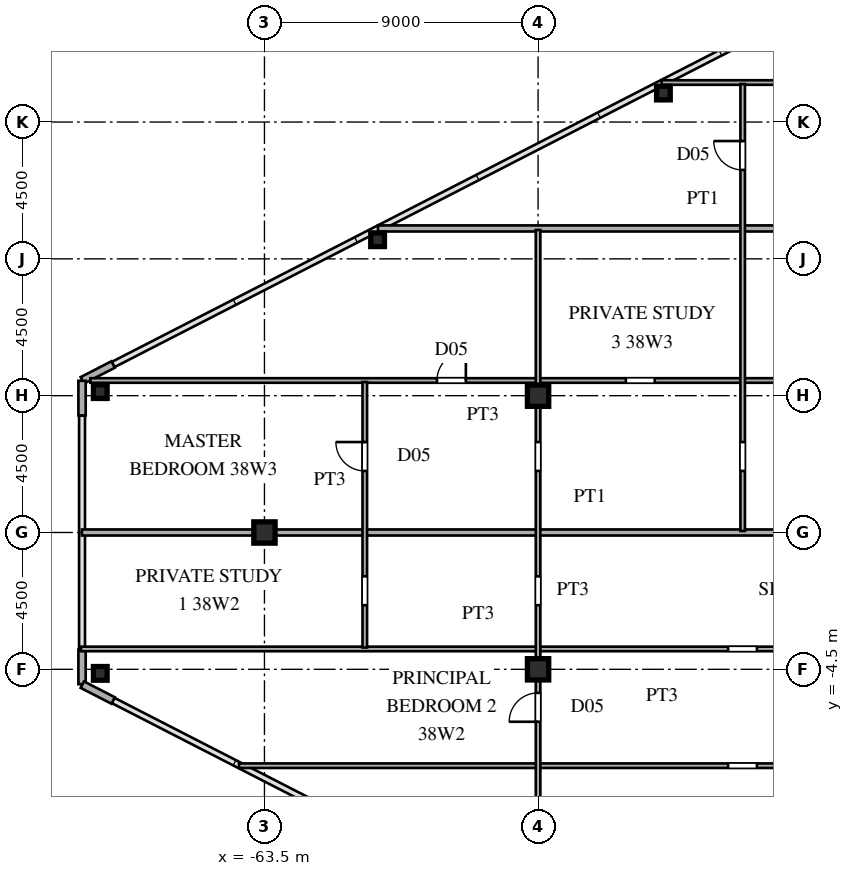
"""IFC4 building model, lengths in metres.
Left out: names, types, materials, properties, quantities, classifications, styles, units other than length and angle.
Written with IfcOpenShell. Run it as: python <this file> out.ifc"""

import sys

from ifc_helpers import new_model, si_unit, direction, frame, frame_2d, origin, origin_2d, place, context, subcontext, project, spatial, rectangle, hollow_rectangle, i_section, extrude, source, transform, mapped, element, fill, save


model = new_model("IFC4")
c1 = context("Model", 3, precision=1e-05, world=origin(), true_north=direction((0.0, 1.0)))
c2 = subcontext(c1, "Body", "Model", "MODEL_VIEW")
j1 = project(units=[si_unit("LENGTHUNIT", "METRE"), si_unit("PLANEANGLEUNIT", "RADIAN")], contexts=[c1])
p1 = place(None, origin())
s1 = spatial("IfcSite", under=j1, at=p1, CompositionType="ELEMENT")
p2 = place(p1, origin())
s2 = spatial("IfcBuilding", under=s1, at=p2, CompositionType="ELEMENT")
p3 = place(p2, frame((0.0, 0.0, 144.0)))
s3 = spatial("IfcBuildingStorey", under=s2, at=p3, CompositionType="ELEMENT", Elevation=144.0)
m1 = source(origin(), c2, "Body", "SweptSolid", [
    extrude(i_section(OverallWidth=0.7, OverallDepth=0.7, WebThickness=0.028, FlangeThickness=0.045, at=origin_2d()), origin(), (0.0, 0.0, 1.0), 3.6),
])
for number, where, z_axis, x_axis in (
    (1, (-54.5, -4.5, 0.0), (0.0, 0.0, 1.0), (1.0, 0.0, 0.0)),
    (2, (-54.5, 4.5, 0.0), (0.0, 0.0, 1.0), (1.0, 0.0, 0.0)),
    (3, (-63.5, 0.0, 0.0), (0.0, 0.0, 1.0), (1.0, 0.0, 0.0)),
):
    element("IfcColumn", number, at=place(p3, frame(where, z_axis=z_axis, x_axis=x_axis)), inside=s3, PredefinedType="COLUMN", context=c2, shape_type="MappedRepresentation", body=[
        mapped(m1, transform((0.0, 0.0, 0.0), scale=1.0)),
    ])
m2 = source(origin(), c2, "Body", "SweptSolid", [
    extrude(hollow_rectangle(XDim=0.45, YDim=0.45, WallThickness=0.018, at=origin_2d()), origin(), (0.0, 0.0, 1.0), 3.6),
])
for number, where, z_axis, x_axis in (
    (4, (-68.9, 4.634, 0.0), (0.0, 0.0, 1.0), (1.0, 0.0, 0.0)),
    (5, (-68.9, -4.634, 0.0), (0.0, 0.0, 1.0), (1.0, 0.0, 0.0)),
    (6, (-50.377, 14.453, 0.0), (0.0, 0.0, 1.0), (1.0, 0.0, 0.0)),
    (7, (-59.779, 9.629, 0.0), (0.0, 0.0, 1.0), (1.0, 0.0, 0.0)),
):
    element("IfcColumn", number, at=place(p3, frame(where, z_axis=z_axis, x_axis=x_axis)), inside=s3, PredefinedType="COLUMN", context=c2, shape_type="MappedRepresentation", body=[
        mapped(m2, transform((0.0, 0.0, 0.0), scale=1.0)),
    ])
p4 = place(p3, frame((-68.477, 5.525, 0.0), z_axis=(0.0, 0.0, 1.0), x_axis=(-0.889797395748, -0.456355776255, 0.0)))
e8 = element("IfcWall", 8, at=p4, inside=s3, PredefinedType="SOLIDWALL", context=c2, shape_type="SweptSolid", body=[
    extrude(rectangle(XDim=1.14, YDim=0.24, at=frame_2d((0.57, 0.0))), origin(), (0.0, 0.0, 1.0), 3.38),
])
for number, where, z_axis, x_axis in (
    (9, (-69.5, 4.99, 0.0), (0.0, 0.0, 1.0), (0.0, -1.0, 0.0)),
    (10, (-69.5, -3.85, 0.0), (0.0, 0.0, 1.0), (0.0, -1.0, 0.0)),
):
    element("IfcWall", number, at=place(p3, frame(where, z_axis=z_axis, x_axis=x_axis)), inside=s3, PredefinedType="SOLIDWALL", context=c2, shape_type="SweptSolid", body=[
        extrude(rectangle(XDim=1.14, YDim=0.24, at=frame_2d((0.57, 0.0))), origin(), (0.0, 0.0, 1.0), 3.38),
    ])
p5 = place(p3, frame((-69.491, -5.005, 0.0), z_axis=(0.0, 0.0, 1.0), x_axis=(0.889797395748, -0.456355776255, 0.0)))
e11 = element("IfcWall", 11, at=p5, inside=s3, PredefinedType="SOLIDWALL", context=c2, shape_type="SweptSolid", body=[
    extrude(rectangle(XDim=1.14, YDim=0.24, at=frame_2d((0.57, 0.0))), origin(), (0.0, 0.0, 1.0), 3.38),
])
p6 = place(p3, frame((-64.338, -7.67, 0.0), z_axis=(0.0, 0.0, 1.0), x_axis=(1.0, 0.0, 0.0)))
e12 = element("IfcWall", 12, at=p6, inside=s3, PredefinedType="PARTITIONING", context=c2, shape_type="SweptSolid", body=[
    extrude(rectangle(XDim=23.238, YDim=0.15, at=frame_2d((11.619, 0.0))), origin(), (0.0, 0.0, 1.0), 3.38),
])
p7 = place(p6, frame((16.088, 0.0, 0.0)))
e13 = element("IfcOpeningElement", 13, at=p7, cuts=e12, PredefinedType="OPENING", context=c2, shape_type="SweptSolid", body=[
    extrude(rectangle(XDim=0.95, YDim=2.15, at=frame_2d((0.475, 1.075))), frame((0.0, 0.085, 0.0), z_axis=(0.0, -1.0, 0.0), x_axis=(1.0, 0.0, 0.0)), (0.0, 0.0, 1.0), 0.17),
])
p8 = place(p3, frame((-69.535, -3.83, 0.0), z_axis=(0.0, 0.0, 1.0), x_axis=(1.0, 0.0, 0.0)))
e14 = element("IfcWall", 14, at=p8, inside=s3, PredefinedType="PARTITIONING", context=c2, shape_type="SweptSolid", body=[
    extrude(rectangle(XDim=28.435, YDim=0.15, at=frame_2d((14.217, 0.0))), origin(), (0.0, 0.0, 1.0), 3.38),
])
p9 = place(p8, frame((21.285, 0.0, 0.0)))
e15 = element("IfcOpeningElement", 15, at=p9, cuts=e14, PredefinedType="OPENING", context=c2, shape_type="SweptSolid", body=[
    extrude(rectangle(XDim=0.95, YDim=2.15, at=frame_2d((0.475, 1.075))), frame((0.0, 0.085, 0.0), z_axis=(0.0, -1.0, 0.0), x_axis=(1.0, 0.0, 0.0)), (0.0, 0.0, 1.0), 0.17),
])
p10 = place(p3, frame((-69.505, 0.0, 0.0), z_axis=(0.0, 0.0, 1.0), x_axis=(1.0, 0.0, 0.0)))
e16 = element("IfcWall", 16, at=p10, inside=s3, PredefinedType="PARTITIONING", context=c2, shape_type="SweptSolid", body=[
    extrude(rectangle(XDim=31.125, YDim=0.2, at=frame_2d((15.562, 0.0))), origin(), (0.0, 0.0, 1.0), 3.38),
])
p11 = place(p3, frame((-69.226, 5.0, 0.0), z_axis=(0.0, 0.0, 1.0), x_axis=(1.0, 0.0, 0.0)))
e17 = element("IfcWall", 17, at=p11, inside=s3, PredefinedType="PARTITIONING", context=c2, shape_type="SweptSolid", body=[
    extrude(rectangle(XDim=28.126, YDim=0.15, at=frame_2d((14.063, 0.0))), origin(), (0.0, 0.0, 1.0), 3.38),
])
p12 = place(p11, frame((11.401, 0.0, 0.0)))
e18 = element("IfcOpeningElement", 18, at=p12, cuts=e17, PredefinedType="OPENING", context=c2, shape_type="SweptSolid", body=[
    extrude(rectangle(XDim=0.95, YDim=2.15, at=frame_2d((0.475, 1.075))), frame((0.0, 0.085, 0.0), z_axis=(0.0, -1.0, 0.0), x_axis=(1.0, 0.0, 0.0)), (0.0, 0.0, 1.0), 0.17),
])
p13 = place(p11, frame((17.614, 0.0, 0.0)))
e19 = element("IfcOpeningElement", 19, at=p13, cuts=e17, PredefinedType="OPENING", context=c2, shape_type="SweptSolid", body=[
    extrude(rectangle(XDim=0.95, YDim=2.15, at=frame_2d((0.475, 1.075))), frame((0.0, 0.085, 0.0), z_axis=(0.0, -1.0, 0.0), x_axis=(1.0, 0.0, 0.0)), (0.0, 0.0, 1.0), 0.17),
])
p14 = place(p3, frame((-59.767, 10.0, 0.0), z_axis=(0.0, 0.0, 1.0), x_axis=(1.0, 0.0, 0.0)))
e20 = element("IfcWall", 20, at=p14, inside=s3, PredefinedType="PARTITIONING", context=c2, shape_type="SweptSolid", body=[
    extrude(rectangle(XDim=21.387, YDim=0.2, at=frame_2d((10.694, 0.0))), origin(), (0.0, 0.0, 1.0), 3.38),
])
p15 = place(p3, frame((-50.438, 14.8, 0.0), z_axis=(0.0, 0.0, 1.0), x_axis=(1.0, 0.0, 0.0)))
e21 = element("IfcWall", 21, at=p15, inside=s3, PredefinedType="PARTITIONING", context=c2, shape_type="SweptSolid", body=[
    extrude(rectangle(XDim=9.338, YDim=0.15, at=frame_2d((4.669, 0.0))), origin(), (0.0, 0.0, 1.0), 3.38),
])
p16 = place(p15, frame((5.551, 0.0, 0.0)))
e22 = element("IfcOpeningElement", 22, at=p16, cuts=e21, PredefinedType="OPENING", context=c2, shape_type="SweptSolid", body=[
    extrude(rectangle(XDim=0.95, YDim=2.15, at=frame_2d((0.475, 1.075))), frame((0.0, 0.085, 0.0), z_axis=(0.0, -1.0, 0.0), x_axis=(1.0, 0.0, 0.0)), (0.0, 0.0, 1.0), 0.17),
])
p17 = place(p3, frame((-60.2, -3.783, 0.0), z_axis=(0.0, 0.0, 1.0), x_axis=(0.0, 1.0, 0.0)))
e23 = element("IfcWall", 23, at=p17, inside=s3, PredefinedType="PARTITIONING", context=c2, shape_type="SweptSolid", body=[
    extrude(rectangle(XDim=8.733, YDim=0.15, at=frame_2d((4.366, 0.0))), origin(), (0.0, 0.0, 1.0), 3.38),
])
p18 = place(p17, frame((1.391, 0.0, 0.0)))
e24 = element("IfcOpeningElement", 24, at=p18, cuts=e23, PredefinedType="OPENING", context=c2, shape_type="SweptSolid", body=[
    extrude(rectangle(XDim=0.95, YDim=2.15, at=frame_2d((0.475, 1.075))), frame((0.0, 0.085, 0.0), z_axis=(0.0, -1.0, 0.0), x_axis=(1.0, 0.0, 0.0)), (0.0, 0.0, 1.0), 0.17),
])
p19 = place(p17, frame((5.808, 0.0, 0.0)))
e25 = element("IfcOpeningElement", 25, at=p19, cuts=e23, PredefinedType="OPENING", context=c2, shape_type="SweptSolid", body=[
    extrude(rectangle(XDim=0.95, YDim=2.15, at=frame_2d((0.475, 1.075))), frame((0.0, 0.085, 0.0), z_axis=(0.0, -1.0, 0.0), x_axis=(1.0, 0.0, 0.0)), (0.0, 0.0, 1.0), 0.17),
])
p20 = place(p3, frame((-54.5, -11.45, 0.0), z_axis=(0.0, 0.0, 1.0), x_axis=(0.0, 1.0, 0.0)))
e26 = element("IfcWall", 26, at=p20, inside=s3, PredefinedType="PARTITIONING", context=c2, shape_type="SweptSolid", body=[
    extrude(rectangle(XDim=21.4, YDim=0.15, at=frame_2d((10.7, 0.0))), origin(), (0.0, 0.0, 1.0), 2.78),
])
p21 = place(p20, frame((5.225, 0.0, 0.0)))
e27 = element("IfcOpeningElement", 27, at=p21, cuts=e26, PredefinedType="OPENING", context=c2, shape_type="SweptSolid", body=[
    extrude(rectangle(XDim=0.95, YDim=2.15, at=frame_2d((0.475, 1.075))), frame((0.0, 0.085, 0.0), z_axis=(0.0, -1.0, 0.0), x_axis=(1.0, 0.0, 0.0)), (0.0, 0.0, 1.0), 0.17),
])
p22 = place(p20, frame((1.392, 0.0, 0.0)))
e28 = element("IfcOpeningElement", 28, at=p22, cuts=e26, PredefinedType="OPENING", context=c2, shape_type="SweptSolid", body=[
    extrude(rectangle(XDim=0.95, YDim=2.15, at=frame_2d((0.475, 1.075))), frame((0.0, 0.085, 0.0), z_axis=(0.0, -1.0, 0.0), x_axis=(1.0, 0.0, 0.0)), (0.0, 0.0, 1.0), 0.17),
])
p23 = place(p20, frame((9.058, 0.0, 0.0)))
e29 = element("IfcOpeningElement", 29, at=p23, cuts=e26, PredefinedType="OPENING", context=c2, shape_type="SweptSolid", body=[
    extrude(rectangle(XDim=0.95, YDim=2.15, at=frame_2d((0.475, 1.075))), frame((0.0, 0.085, 0.0), z_axis=(0.0, -1.0, 0.0), x_axis=(1.0, 0.0, 0.0)), (0.0, 0.0, 1.0), 0.17),
])
p24 = place(p20, frame((13.475, 0.0, 0.0)))
e30 = element("IfcOpeningElement", 30, at=p24, cuts=e26, PredefinedType="OPENING", context=c2, shape_type="SweptSolid", body=[
    extrude(rectangle(XDim=0.95, YDim=2.15, at=frame_2d((0.475, 1.075))), frame((0.0, 0.085, 0.0), z_axis=(0.0, -1.0, 0.0), x_axis=(1.0, 0.0, 0.0)), (0.0, 0.0, 1.0), 0.17),
])
p25 = place(p3, frame((-47.77, 0.05, 0.0), z_axis=(0.0, 0.0, 1.0), x_axis=(0.0, 1.0, 0.0)))
e31 = element("IfcWall", 31, at=p25, inside=s3, PredefinedType="PARTITIONING", context=c2, shape_type="SweptSolid", body=[
    extrude(rectangle(XDim=14.7, YDim=0.15, at=frame_2d((7.35, 0.0))), origin(), (0.0, 0.0, 1.0), 3.38),
])
p26 = place(p25, frame((1.975, 0.0, 0.0)))
e32 = element("IfcOpeningElement", 32, at=p26, cuts=e31, PredefinedType="OPENING", context=c2, shape_type="SweptSolid", body=[
    extrude(rectangle(XDim=0.95, YDim=2.15, at=frame_2d((0.475, 1.075))), frame((0.0, 0.085, 0.0), z_axis=(0.0, -1.0, 0.0), x_axis=(1.0, 0.0, 0.0)), (0.0, 0.0, 1.0), 0.17),
])
p27 = place(p25, frame((11.875, 0.0, 0.0)))
e33 = element("IfcOpeningElement", 33, at=p27, cuts=e31, PredefinedType="OPENING", context=c2, shape_type="SweptSolid", body=[
    extrude(rectangle(XDim=0.95, YDim=2.15, at=frame_2d((0.475, 1.075))), frame((0.0, 0.085, 0.0), z_axis=(0.0, -1.0, 0.0), x_axis=(1.0, 0.0, 0.0)), (0.0, 0.0, 1.0), 0.17),
])
m3 = source(origin(), c2, "Body", "SweptSolid", [
    extrude(rectangle(XDim=0.95, YDim=2.15, at=frame_2d((0.475, 1.075))), frame((0.0, 0.025, 0.0), z_axis=(0.0, -1.0, 0.0), x_axis=(1.0, 0.0, 0.0)), (0.0, 0.0, 1.0), 0.05),
])
p28 = place(p12, origin())
e34 = element("IfcDoor", 34, at=p28, inside=s3, OperationType="SINGLE_SWING_RIGHT", PredefinedType="DOOR", context=c2, shape_type="MappedRepresentation", body=[
    mapped(m3, transform((0.0, 0.0, 0.0), scale=1.0)),
])
fill(e18, e34)
p29 = place(p19, origin())
e35 = element("IfcDoor", 35, at=p29, inside=s3, OperationType="SINGLE_SWING_RIGHT", PredefinedType="DOOR", context=c2, shape_type="MappedRepresentation", body=[
    mapped(m3, transform((0.0, 0.0, 0.0), scale=1.0)),
])
fill(e25, e35)
p30 = place(p21, origin())
e36 = element("IfcDoor", 36, at=p30, inside=s3, OperationType="SINGLE_SWING_LEFT", PredefinedType="DOOR", context=c2, shape_type="MappedRepresentation", body=[
    mapped(m3, transform((0.0, 0.0, 0.0), scale=1.0)),
])
fill(e27, e36)
p31 = place(p27, origin())
e37 = element("IfcDoor", 37, at=p31, inside=s3, OperationType="SINGLE_SWING_RIGHT", PredefinedType="DOOR", context=c2, shape_type="MappedRepresentation", body=[
    mapped(m3, transform((0.0, 0.0, 0.0), scale=1.0)),
])
fill(e33, e37)
save(model, sys.argv[1])
